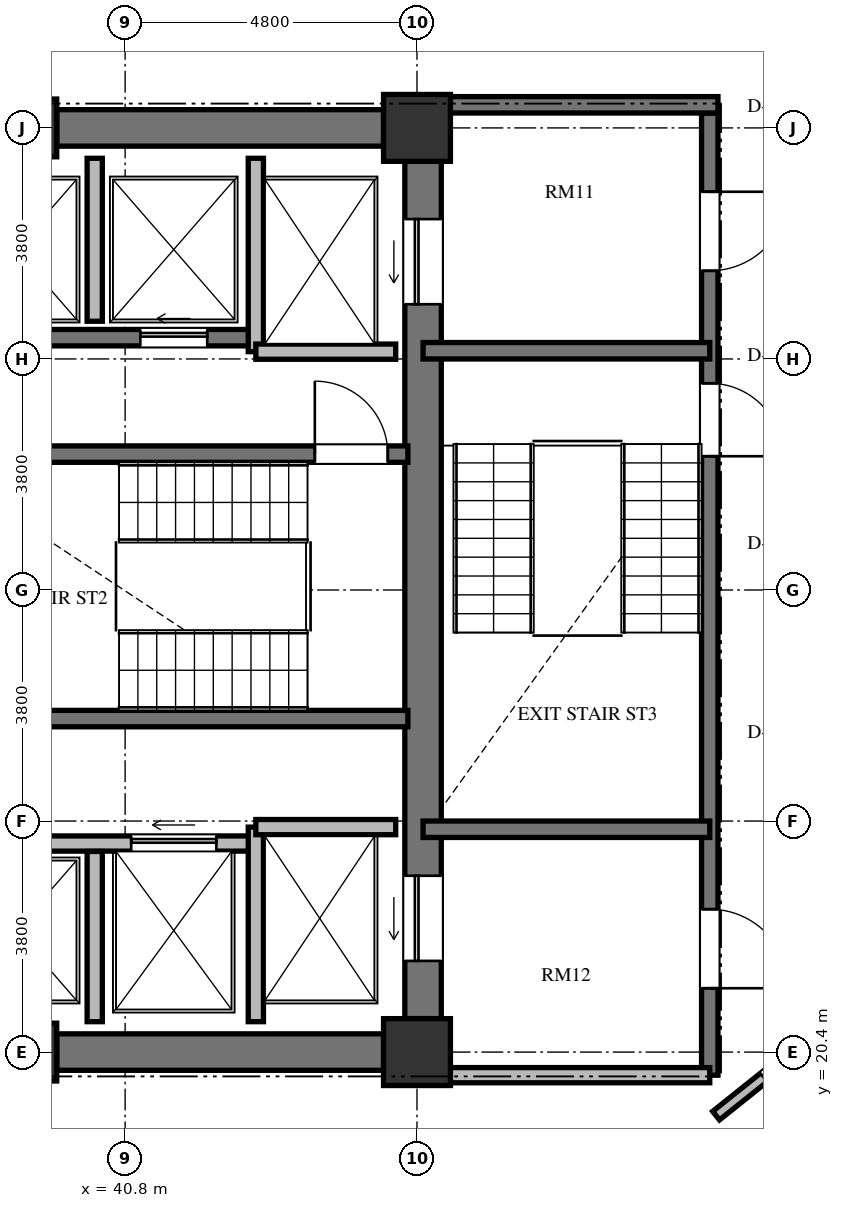
"""IFC4 building model, lengths in metres.
Left out: names, types, materials, properties, quantities, classifications, styles, units other than length and angle.
Written with IfcOpenShell. Run it as: python <this file> out.ifc"""

import sys

from ifc_helpers import new_model, si_unit, direction, frame, frame_2d, origin, origin_2d, place, context, subcontext, project, spatial, rectangle, extrude, element, fill, save


model = new_model("IFC4")
c1 = context("Model", 3, precision=1e-05, world=origin(), true_north=direction((0.0, 1.0)))
c2 = subcontext(c1, "Body", "Model", "MODEL_VIEW")
j1 = project(units=[si_unit("LENGTHUNIT", "METRE"), si_unit("PLANEANGLEUNIT", "RADIAN")], contexts=[c1])
p1 = place(None, origin())
s1 = spatial("IfcSite", under=j1, at=p1, CompositionType="ELEMENT")
p2 = place(p1, origin())
s2 = spatial("IfcBuilding", under=s1, at=p2, CompositionType="ELEMENT")
p3 = place(p2, frame((0.0, 0.0, 141.936)))
s3 = spatial("IfcBuildingStorey", under=s2, at=p3, CompositionType="ELEMENT", Elevation=141.936)
p4 = place(p3, frame((39.2, 20.4, 0.0), z_axis=(0.0, 0.0, 1.0), x_axis=(1.0, 0.0, 0.0)))
e1 = element("IfcColumn", 1, at=p4, inside=s3, PredefinedType="COLUMN", context=c2, shape_type="SweptSolid", body=[
    extrude(rectangle(XDim=0.95, YDim=0.95, at=origin_2d()), origin(), (0.0, 0.0, 1.0), 3.648),
])
for number, where, z_axis, x_axis in (
    (2, (45.6, 20.4, 0.0), (0.0, 0.0, 1.0), (1.0, 0.0, 0.0)),
    (3, (45.6, 35.6, 0.0), (0.0, 0.0, 1.0), (1.0, 0.0, 0.0)),
):
    element("IfcColumn", number, at=place(p3, frame(where, z_axis=z_axis, x_axis=x_axis)), inside=s3, PredefinedType="COLUMN", context=c2, shape_type="SweptSolid", body=[
        extrude(rectangle(XDim=1.1, YDim=1.1, at=origin_2d()), origin(), (0.0, 0.0, 1.0), 3.648),
    ])
p5 = place(p3, frame((39.2, 35.6, 0.0), z_axis=(0.0, 0.0, 1.0), x_axis=(1.0, 0.0, 0.0)))
e4 = element("IfcColumn", 4, at=p5, inside=s3, PredefinedType="COLUMN", context=c2, shape_type="SweptSolid", body=[
    extrude(rectangle(XDim=0.95, YDim=0.95, at=origin_2d()), origin(), (0.0, 0.0, 1.0), 3.648),
])
p6 = place(p3, frame((45.7, 20.95, 0.0), z_axis=(0.0, 0.0, 1.0), x_axis=(0.0, 1.0, 0.0)))
e5 = element("IfcWall", 5, at=p6, inside=s3, PredefinedType="SHEAR", context=c2, shape_type="SweptSolid", body=[
    extrude(rectangle(XDim=14.1, YDim=0.6, at=frame_2d((7.05, 0.0))), origin(), (0.0, 0.0, 1.0), 3.648),
])
p7 = place(p6, frame((11.75, 0.0, 0.0)))
e6 = element("IfcOpeningElement", 6, at=p7, cuts=e5, PredefinedType="OPENING", context=c2, shape_type="SweptSolid", body=[
    extrude(rectangle(XDim=1.4, YDim=2.3, at=frame_2d((0.7, 1.15))), frame((0.0, 0.31, 0.0), z_axis=(0.0, -1.0, 0.0), x_axis=(1.0, 0.0, 0.0)), (0.0, 0.0, 1.0), 0.62),
])
p8 = place(p6, frame((0.95, 0.0, 0.0)))
e7 = element("IfcOpeningElement", 7, at=p8, cuts=e5, PredefinedType="OPENING", context=c2, shape_type="SweptSolid", body=[
    extrude(rectangle(XDim=1.4, YDim=2.3, at=frame_2d((0.7, 1.15))), frame((0.0, 0.31, 0.0), z_axis=(0.0, -1.0, 0.0), x_axis=(1.0, 0.0, 0.0)), (0.0, 0.0, 1.0), 0.62),
])
for number, where, z_axis, x_axis in (
    (8, (39.675, 20.4, 0.0), (0.0, 0.0, 1.0), (1.0, 0.0, 0.0)),
    (9, (39.675, 35.6, 0.0), (0.0, 0.0, 1.0), (1.0, 0.0, 0.0)),
):
    element("IfcWall", number, at=place(p3, frame(where, z_axis=z_axis, x_axis=x_axis)), inside=s3, PredefinedType="SHEAR", context=c2, shape_type="SweptSolid", body=[
        extrude(rectangle(XDim=5.375, YDim=0.6, at=frame_2d((2.688, 0.0))), origin(), (0.0, 0.0, 1.0), 3.648),
    ])
p9 = place(p3, frame((37.465, 30.235, 0.0), z_axis=(0.0, 0.0, 1.0), x_axis=(1.0, 0.0, 0.0)))
e10 = element("IfcWall", 10, at=p9, inside=s3, PredefinedType="SHEAR", context=c2, shape_type="SweptSolid", body=[
    extrude(rectangle(XDim=7.985, YDim=0.27, at=frame_2d((3.992, 0.0))), origin(), (0.0, 0.0, 1.0), 3.648),
])
p10 = place(p9, frame((6.455, 0.0, 0.0)))
e11 = element("IfcOpeningElement", 11, at=p10, cuts=e10, PredefinedType="OPENING", context=c2, shape_type="SweptSolid", body=[
    extrude(rectangle(XDim=1.2, YDim=2.15, at=frame_2d((0.6, 1.075))), frame((0.0, 0.145, 0.0), z_axis=(0.0, -1.0, 0.0), x_axis=(1.0, 0.0, 0.0)), (0.0, 0.0, 1.0), 0.29),
])
p11 = place(p3, frame((37.465, 25.885, 0.0), z_axis=(0.0, 0.0, 1.0), x_axis=(1.0, 0.0, 0.0)))
e12 = element("IfcWall", 12, at=p11, inside=s3, PredefinedType="SHEAR", context=c2, shape_type="SweptSolid", body=[
    extrude(rectangle(XDim=7.985, YDim=0.27, at=frame_2d((3.992, 0.0))), origin(), (0.0, 0.0, 1.0), 3.648),
])
p12 = place(p3, frame((26.55, 32.15, 0.0), z_axis=(0.0, 0.0, 1.0), x_axis=(1.0, 0.0, 0.0)))
e13 = element("IfcWall", 13, at=p12, inside=s3, PredefinedType="SHEAR", context=c2, shape_type="SweptSolid", body=[
    extrude(rectangle(XDim=16.4, YDim=0.27, at=frame_2d((8.2, 0.0))), origin(), (0.0, 0.0, 1.0), 3.648),
])
p13 = place(p12, frame((1.525, 0.0, 0.0)))
e14 = element("IfcOpeningElement", 14, at=p13, cuts=e13, PredefinedType="OPENING", context=c2, shape_type="SweptSolid", body=[
    extrude(rectangle(XDim=1.05, YDim=2.15, at=frame_2d((0.525, 1.075))), frame((0.0, 0.145, 0.0), z_axis=(0.0, -1.0, 0.0), x_axis=(1.0, 0.0, 0.0)), (0.0, 0.0, 1.0), 0.29),
])
p14 = place(p12, frame((4.275, 0.0, 0.0)))
e15 = element("IfcOpeningElement", 15, at=p14, cuts=e13, PredefinedType="OPENING", context=c2, shape_type="SweptSolid", body=[
    extrude(rectangle(XDim=0.95, YDim=2.1, at=frame_2d((0.475, 1.05))), frame((0.0, 0.145, 0.0), z_axis=(0.0, -1.0, 0.0), x_axis=(1.0, 0.0, 0.0)), (0.0, 0.0, 1.0), 0.29),
])
p15 = place(p12, frame((6.5, 0.0, 0.0)))
e16 = element("IfcOpeningElement", 16, at=p15, cuts=e13, PredefinedType="OPENING", context=c2, shape_type="SweptSolid", body=[
    extrude(rectangle(XDim=1.1, YDim=2.2, at=frame_2d((0.55, 1.1))), frame((0.0, 0.145, 0.0), z_axis=(0.0, -1.0, 0.0), x_axis=(1.0, 0.0, 0.0)), (0.0, 0.0, 1.0), 0.29),
])
p16 = place(p12, frame((9.1, 0.0, 0.0)))
e17 = element("IfcOpeningElement", 17, at=p16, cuts=e13, PredefinedType="OPENING", context=c2, shape_type="SweptSolid", body=[
    extrude(rectangle(XDim=1.1, YDim=2.2, at=frame_2d((0.55, 1.1))), frame((0.0, 0.145, 0.0), z_axis=(0.0, -1.0, 0.0), x_axis=(1.0, 0.0, 0.0)), (0.0, 0.0, 1.0), 0.29),
])
p17 = place(p12, frame((11.9, 0.0, 0.0)))
e18 = element("IfcOpeningElement", 18, at=p17, cuts=e13, PredefinedType="OPENING", context=c2, shape_type="SweptSolid", body=[
    extrude(rectangle(XDim=1.1, YDim=2.2, at=frame_2d((0.55, 1.1))), frame((0.0, 0.145, 0.0), z_axis=(0.0, -1.0, 0.0), x_axis=(1.0, 0.0, 0.0)), (0.0, 0.0, 1.0), 0.29),
])
p18 = place(p12, frame((14.5, 0.0, 0.0)))
e19 = element("IfcOpeningElement", 19, at=p18, cuts=e13, PredefinedType="OPENING", context=c2, shape_type="SweptSolid", body=[
    extrude(rectangle(XDim=1.1, YDim=2.2, at=frame_2d((0.55, 1.1))), frame((0.0, 0.145, 0.0), z_axis=(0.0, -1.0, 0.0), x_axis=(1.0, 0.0, 0.0)), (0.0, 0.0, 1.0), 0.29),
])
p19 = place(p3, frame((26.75, 23.83, 0.0), z_axis=(0.0, 0.0, 1.0), x_axis=(1.0, 0.0, 0.0)))
e20 = element("IfcWall", 20, at=p19, inside=s3, PredefinedType="SOLIDWALL", context=c2, shape_type="SweptSolid", body=[
    extrude(rectangle(XDim=16.2, YDim=0.25, at=frame_2d((8.1, 0.0))), origin(), (0.0, 0.0, 1.0), 3.428),
])
p20 = place(p19, frame((0.335, 0.0, 0.0)))
e21 = element("IfcOpeningElement", 21, at=p20, cuts=e20, PredefinedType="OPENING", context=c2, shape_type="SweptSolid", body=[
    extrude(rectangle(XDim=0.95, YDim=2.1, at=frame_2d((0.475, 1.05))), frame((0.0, 0.135, 0.0), z_axis=(0.0, -1.0, 0.0), x_axis=(1.0, 0.0, 0.0)), (0.0, 0.0, 1.0), 0.27),
])
p21 = place(p19, frame((2.975, 0.0, 0.0)))
e22 = element("IfcOpeningElement", 22, at=p21, cuts=e20, PredefinedType="OPENING", context=c2, shape_type="SweptSolid", body=[
    extrude(rectangle(XDim=1.05, YDim=2.15, at=frame_2d((0.525, 1.075))), frame((0.0, 0.135, 0.0), z_axis=(0.0, -1.0, 0.0), x_axis=(1.0, 0.0, 0.0)), (0.0, 0.0, 1.0), 0.27),
])
p22 = place(p19, frame((6.3, 0.0, 0.0)))
e23 = element("IfcOpeningElement", 23, at=p22, cuts=e20, PredefinedType="OPENING", context=c2, shape_type="SweptSolid", body=[
    extrude(rectangle(XDim=1.1, YDim=2.2, at=frame_2d((0.55, 1.1))), frame((0.0, 0.135, 0.0), z_axis=(0.0, -1.0, 0.0), x_axis=(1.0, 0.0, 0.0)), (0.0, 0.0, 1.0), 0.27),
])
p23 = place(p19, frame((8.9, 0.0, 0.0)))
e24 = element("IfcOpeningElement", 24, at=p23, cuts=e20, PredefinedType="OPENING", context=c2, shape_type="SweptSolid", body=[
    extrude(rectangle(XDim=1.1, YDim=2.2, at=frame_2d((0.55, 1.1))), frame((0.0, 0.135, 0.0), z_axis=(0.0, -1.0, 0.0), x_axis=(1.0, 0.0, 0.0)), (0.0, 0.0, 1.0), 0.27),
])
p24 = place(p19, frame((11.7, 0.0, 0.0)))
e25 = element("IfcOpeningElement", 25, at=p24, cuts=e20, PredefinedType="OPENING", context=c2, shape_type="SweptSolid", body=[
    extrude(rectangle(XDim=1.1, YDim=2.2, at=frame_2d((0.55, 1.1))), frame((0.0, 0.135, 0.0), z_axis=(0.0, -1.0, 0.0), x_axis=(1.0, 0.0, 0.0)), (0.0, 0.0, 1.0), 0.27),
])
p25 = place(p19, frame((14.15, 0.0, 0.0)))
e26 = element("IfcOpeningElement", 26, at=p25, cuts=e20, PredefinedType="OPENING", context=c2, shape_type="SweptSolid", body=[
    extrude(rectangle(XDim=1.4, YDim=2.3, at=frame_2d((0.7, 1.15))), frame((0.0, 0.135, 0.0), z_axis=(0.0, -1.0, 0.0), x_axis=(1.0, 0.0, 0.0)), (0.0, 0.0, 1.0), 0.27),
])
p26 = place(p3, frame((42.95, 31.92, 0.0), z_axis=(0.0, 0.0, 1.0), x_axis=(0.0, 1.0, 0.0)))
e27 = element("IfcWall", 27, at=p26, inside=s3, PredefinedType="SOLIDWALL", context=c2, shape_type="SweptSolid", body=[
    extrude(rectangle(XDim=3.18, YDim=0.25, at=frame_2d((1.59, 0.0))), origin(), (0.0, 0.0, 1.0), 3.428),
])
p27 = place(p3, frame((42.95, 31.92, 0.0), z_axis=(0.0, 0.0, 1.0), x_axis=(1.0, 0.0, 0.0)))
e28 = element("IfcWall", 28, at=p27, inside=s3, PredefinedType="SOLIDWALL", context=c2, shape_type="SweptSolid", body=[
    extrude(rectangle(XDim=2.3, YDim=0.25, at=frame_2d((1.15, 0.0))), origin(), (0.0, 0.0, 1.0), 3.428),
])
p28 = place(p3, frame((42.95, 20.9, 0.0), z_axis=(0.0, 0.0, 1.0), x_axis=(0.0, 1.0, 0.0)))
e29 = element("IfcWall", 29, at=p28, inside=s3, PredefinedType="SOLIDWALL", context=c2, shape_type="SweptSolid", body=[
    extrude(rectangle(XDim=3.2, YDim=0.25, at=frame_2d((1.6, 0.0))), origin(), (0.0, 0.0, 1.0), 3.428),
])
p29 = place(p3, frame((42.95, 24.1, 0.0), z_axis=(0.0, 0.0, 1.0), x_axis=(1.0, 0.0, 0.0)))
e30 = element("IfcWall", 30, at=p29, inside=s3, PredefinedType="SOLIDWALL", context=c2, shape_type="SweptSolid", body=[
    extrude(rectangle(XDim=2.3, YDim=0.25, at=frame_2d((1.15, 0.0))), origin(), (0.0, 0.0, 1.0), 3.428),
])
p30 = place(p3, frame((40.3, 32.42, 0.0), z_axis=(0.0, 0.0, 1.0), x_axis=(0.0, 1.0, 0.0)))
e31 = element("IfcWall", 31, at=p30, inside=s3, PredefinedType="SOLIDWALL", context=c2, shape_type="SweptSolid", body=[
    extrude(rectangle(XDim=2.68, YDim=0.25, at=frame_2d((1.34, 0.0))), origin(), (0.0, 0.0, 1.0), 3.428),
])
p31 = place(p3, frame((40.3, 20.9, 0.0), z_axis=(0.0, 0.0, 1.0), x_axis=(0.0, 1.0, 0.0)))
e32 = element("IfcWall", 32, at=p31, inside=s3, PredefinedType="SOLIDWALL", context=c2, shape_type="SweptSolid", body=[
    extrude(rectangle(XDim=2.8, YDim=0.25, at=frame_2d((1.4, 0.0))), origin(), (0.0, 0.0, 1.0), 3.428),
])
p32 = place(p3, frame((50.415, 35.845, 0.0), z_axis=(0.0, 0.0, 1.0), x_axis=(0.0, -1.0, 0.0)))
e33 = element("IfcWall", 33, at=p32, inside=s3, PredefinedType="SHEAR", context=c2, shape_type="SweptSolid", body=[
    extrude(rectangle(XDim=15.825, YDim=0.27, at=frame_2d((7.913, 0.0))), origin(), (0.0, 0.0, 1.0), 3.648),
])
p33 = place(p32, frame((4.445, 0.0, 0.0)))
e34 = element("IfcOpeningElement", 34, at=p33, cuts=e33, PredefinedType="OPENING", context=c2, shape_type="SweptSolid", body=[
    extrude(rectangle(XDim=1.2, YDim=2.15, at=frame_2d((0.6, 1.075))), frame((0.0, 0.145, 0.0), z_axis=(0.0, -1.0, 0.0), x_axis=(1.0, 0.0, 0.0)), (0.0, 0.0, 1.0), 0.29),
])
p34 = place(p32, frame((1.295, 0.0, 0.0)))
e35 = element("IfcOpeningElement", 35, at=p34, cuts=e33, PredefinedType="OPENING", context=c2, shape_type="SweptSolid", body=[
    extrude(rectangle(XDim=1.3, YDim=2.2, at=frame_2d((0.65, 1.1))), frame((0.0, 0.145, 0.0), z_axis=(0.0, -1.0, 0.0), x_axis=(1.0, 0.0, 0.0)), (0.0, 0.0, 1.0), 0.29),
])
p35 = place(p32, frame((13.095, 0.0, 0.0)))
e36 = element("IfcOpeningElement", 36, at=p35, cuts=e33, PredefinedType="OPENING", context=c2, shape_type="SweptSolid", body=[
    extrude(rectangle(XDim=1.3, YDim=2.2, at=frame_2d((0.65, 1.1))), frame((0.0, 0.145, 0.0), z_axis=(0.0, -1.0, 0.0), x_axis=(1.0, 0.0, 0.0)), (0.0, 0.0, 1.0), 0.29),
])
p36 = place(p3, frame((46.0, 35.98, 0.0), z_axis=(0.0, 0.0, 1.0), x_axis=(1.0, 0.0, 0.0)))
e37 = element("IfcWall", 37, at=p36, inside=s3, PredefinedType="SHEAR", context=c2, shape_type="SweptSolid", body=[
    extrude(rectangle(XDim=4.55, YDim=0.27, at=frame_2d((2.275, 0.0))), origin(), (0.0, 0.0, 1.0), 3.648),
])
for number, where, z_axis, x_axis in (
    (38, (45.7, 31.935, 0.0), (0.0, 0.0, 1.0), (1.0, 0.0, 0.0)),
    (39, (45.7, 24.065, 0.0), (0.0, 0.0, 1.0), (1.0, 0.0, 0.0)),
):
    element("IfcWall", number, at=place(p3, frame(where, z_axis=z_axis, x_axis=x_axis)), inside=s3, PredefinedType="SHEAR", context=c2, shape_type="SweptSolid", body=[
        extrude(rectangle(XDim=4.715, YDim=0.27, at=frame_2d((2.357, 0.0))), origin(), (0.0, 0.0, 1.0), 3.648),
    ])
p37 = place(p3, frame((45.7, 20.02, 0.0), z_axis=(0.0, 0.0, 1.0), x_axis=(1.0, 0.0, 0.0)))
e40 = element("IfcWall", 40, at=p37, inside=s3, PredefinedType="SOLIDWALL", context=c2, shape_type="SweptSolid", body=[
    extrude(rectangle(XDim=4.715, YDim=0.25, at=frame_2d((2.357, 0.0))), origin(), (0.0, 0.0, 1.0), 3.428),
])
p38 = place(p3, frame((53.181, 21.481, 0.0), z_axis=(0.0, 0.0, 1.0), x_axis=(-0.781420737726, -0.624004511724, 0.0)))
e41 = element("IfcWall", 41, at=p38, inside=s3, PredefinedType="PARTITIONING", context=c2, shape_type="SweptSolid", body=[
    extrude(rectangle(XDim=3.407, YDim=0.18, at=frame_2d((1.704, 0.0))), origin(), (0.0, 0.0, 1.0), 3.428),
])
p39 = place(p38, frame((1.004, 0.0, 0.0)))
e42 = element("IfcOpeningElement", 42, at=p39, cuts=e41, PredefinedType="OPENING", context=c2, shape_type="SweptSolid", body=[
    extrude(rectangle(XDim=1.4, YDim=2.2, at=frame_2d((0.7, 1.1))), frame((0.0, 0.1, 0.0), z_axis=(0.0, -1.0, 0.0), x_axis=(1.0, 0.0, 0.0)), (0.0, 0.0, 1.0), 0.2),
])
p40 = place(p10, origin())
e43 = element("IfcDoor", 43, at=p40, inside=s3, OperationType="SINGLE_SWING_LEFT", PredefinedType="DOOR", context=c2, shape_type="SweptSolid", body=[
    extrude(rectangle(XDim=1.2, YDim=2.15, at=frame_2d((0.6, 1.075))), frame((0.0, 0.025, 0.0), z_axis=(0.0, -1.0, 0.0), x_axis=(1.0, 0.0, 0.0)), (0.0, 0.0, 1.0), 0.05),
])
fill(e11, e43)
p41 = place(p18, origin())
e44 = element("IfcDoor", 44, at=p41, inside=s3, OperationType="SLIDING_TO_LEFT", PredefinedType="DOOR", context=c2, shape_type="SweptSolid", body=[
    extrude(rectangle(XDim=1.1, YDim=2.2, at=frame_2d((0.55, 1.1))), frame((0.0, 0.025, 0.0), z_axis=(0.0, -1.0, 0.0), x_axis=(1.0, 0.0, 0.0)), (0.0, 0.0, 1.0), 0.05),
])
fill(e19, e44)
p42 = place(p7, origin())
e45 = element("IfcDoor", 45, at=p42, inside=s3, OperationType="SLIDING_TO_LEFT", PredefinedType="DOOR", context=c2, shape_type="SweptSolid", body=[
    extrude(rectangle(XDim=1.4, YDim=2.3, at=frame_2d((0.7, 1.15))), frame((0.0, 0.025, 0.0), z_axis=(0.0, -1.0, 0.0), x_axis=(1.0, 0.0, 0.0)), (0.0, 0.0, 1.0), 0.05),
])
fill(e6, e45)
p43 = place(p8, origin())
e46 = element("IfcDoor", 46, at=p43, inside=s3, OperationType="SLIDING_TO_LEFT", PredefinedType="DOOR", context=c2, shape_type="SweptSolid", body=[
    extrude(rectangle(XDim=1.4, YDim=2.3, at=frame_2d((0.7, 1.15))), frame((0.0, 0.025, 0.0), z_axis=(0.0, -1.0, 0.0), x_axis=(1.0, 0.0, 0.0)), (0.0, 0.0, 1.0), 0.05),
])
fill(e7, e46)
p44 = place(p25, origin())
e47 = element("IfcDoor", 47, at=p44, inside=s3, OperationType="SLIDING_TO_LEFT", PredefinedType="DOOR", context=c2, shape_type="SweptSolid", body=[
    extrude(rectangle(XDim=1.4, YDim=2.3, at=frame_2d((0.7, 1.15))), frame((0.0, 0.025, 0.0), z_axis=(0.0, -1.0, 0.0), x_axis=(1.0, 0.0, 0.0)), (0.0, 0.0, 1.0), 0.05),
])
fill(e26, e47)
p45 = place(p33, origin())
e48 = element("IfcDoor", 48, at=p45, inside=s3, OperationType="SINGLE_SWING_RIGHT", PredefinedType="DOOR", context=c2, shape_type="SweptSolid", body=[
    extrude(rectangle(XDim=1.2, YDim=2.15, at=frame_2d((0.6, 1.075))), frame((0.0, 0.025, 0.0), z_axis=(0.0, -1.0, 0.0), x_axis=(1.0, 0.0, 0.0)), (0.0, 0.0, 1.0), 0.05),
])
fill(e34, e48)
p46 = place(p34, origin())
e49 = element("IfcDoor", 49, at=p46, inside=s3, OperationType="SINGLE_SWING_LEFT", PredefinedType="DOOR", context=c2, shape_type="SweptSolid", body=[
    extrude(rectangle(XDim=1.3, YDim=2.2, at=frame_2d((0.65, 1.1))), frame((0.0, 0.025, 0.0), z_axis=(0.0, -1.0, 0.0), x_axis=(1.0, 0.0, 0.0)), (0.0, 0.0, 1.0), 0.05),
])
fill(e35, e49)
p47 = place(p35, origin())
e50 = element("IfcDoor", 50, at=p47, inside=s3, OperationType="SINGLE_SWING_RIGHT", PredefinedType="DOOR", context=c2, shape_type="SweptSolid", body=[
    extrude(rectangle(XDim=1.3, YDim=2.2, at=frame_2d((0.65, 1.1))), frame((0.0, 0.025, 0.0), z_axis=(0.0, -1.0, 0.0), x_axis=(1.0, 0.0, 0.0)), (0.0, 0.0, 1.0), 0.05),
])
fill(e36, e50)
p48 = place(p39, origin())
e51 = element("IfcDoor", 51, at=p48, inside=s3, OperationType="SINGLE_SWING_LEFT", PredefinedType="DOOR", context=c2, shape_type="SweptSolid", body=[
    extrude(rectangle(XDim=1.4, YDim=2.2, at=frame_2d((0.7, 1.1))), frame((0.0, 0.025, 0.0), z_axis=(0.0, -1.0, 0.0), x_axis=(1.0, 0.0, 0.0)), (0.0, 0.0, 1.0), 0.05),
])
fill(e42, e51)
save(model, sys.argv[1])
